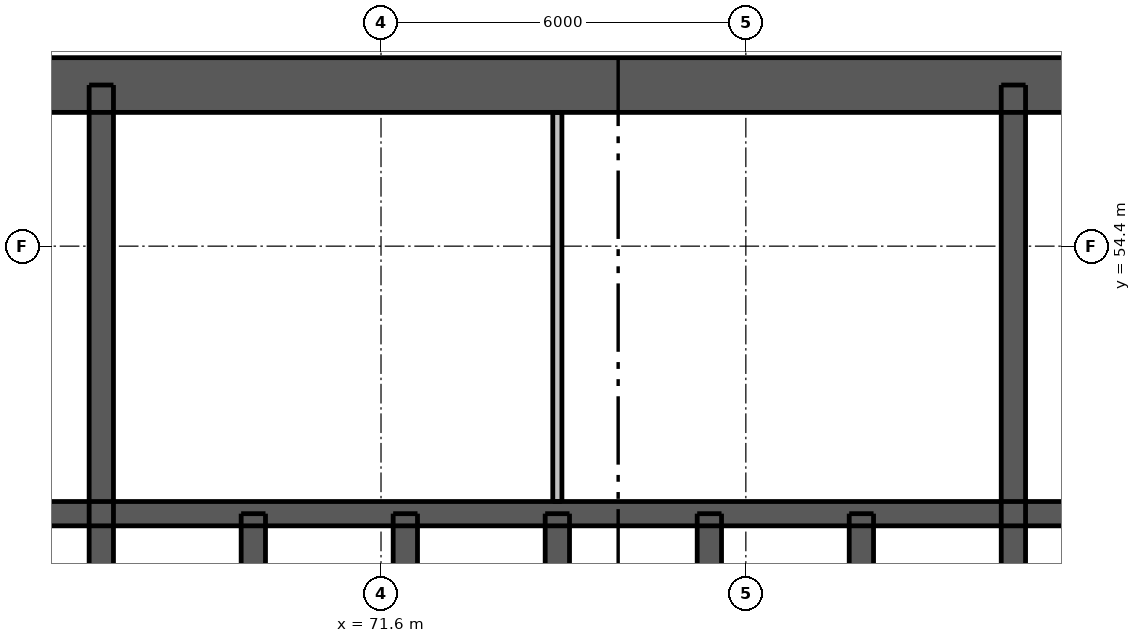
"""IFC4 building model, lengths in metres.
Left out: names, types, materials, properties, quantities, classifications, styles, units other than length and angle.
Written with IfcOpenShell. Run it as: python <this file> out.ifc"""

import sys

from ifc_helpers import new_model, si_unit, direction, frame, frame_2d, origin, place, context, subcontext, project, spatial, rectangle, extrude, element, fill, save


model = new_model("IFC4")
c1 = context("Model", 3, precision=1e-05, world=origin(), true_north=direction((0.0, 1.0)))
c2 = subcontext(c1, "Body", "Model", "MODEL_VIEW")
j1 = project(units=[si_unit("LENGTHUNIT", "METRE"), si_unit("PLANEANGLEUNIT", "RADIAN")], contexts=[c1])
p1 = place(None, origin())
s1 = spatial("IfcSite", under=j1, at=p1, CompositionType="ELEMENT")
p2 = place(p1, origin())
s2 = spatial("IfcBuilding", under=s1, at=p2, CompositionType="ELEMENT")
p3 = place(p2, frame((0.0, 0.0, 33.4)))
s3 = spatial("IfcBuildingStorey", under=s2, at=p3, CompositionType="ELEMENT", Elevation=33.4)
p4 = place(p3, frame((62.5, 57.05, 0.0), z_axis=(0.0, 0.0, 1.0), x_axis=(1.0, 0.0, 0.0)))
e1 = element("IfcWall", 1, at=p4, inside=s3, PredefinedType="SHEAR", context=c2, shape_type="SweptSolid", body=[
    extrude(rectangle(XDim=24.0, YDim=0.9, at=frame_2d((12.0, 0.0))), origin(), (0.0, 0.0, 1.0), 3.05),
])
p5 = place(p4, frame((20.85, 0.0, 0.0)))
e2 = element("IfcOpeningElement", 2, at=p5, cuts=e1, PredefinedType="OPENING", context=c2, shape_type="SweptSolid", body=[
    extrude(rectangle(XDim=1.1, YDim=2.1, at=frame_2d((0.55, 1.05))), frame((0.0, 0.46, 0.0), z_axis=(0.0, -1.0, 0.0), x_axis=(1.0, 0.0, 0.0)), (0.0, 0.0, 1.0), 0.92),
])
p6 = place(p4, frame((2.05, 0.0, 0.0)))
e3 = element("IfcOpeningElement", 3, at=p6, cuts=e1, PredefinedType="OPENING", context=c2, shape_type="SweptSolid", body=[
    extrude(rectangle(XDim=1.1, YDim=2.1, at=frame_2d((0.55, 1.05))), frame((0.0, 0.46, 0.0), z_axis=(0.0, -1.0, 0.0), x_axis=(1.0, 0.0, 0.0)), (0.0, 0.0, 1.0), 0.92),
])
p7 = place(p4, frame((7.9, 0.0, 0.0)))
e4 = element("IfcOpeningElement", 4, at=p7, cuts=e1, PredefinedType="OPENING", context=c2, shape_type="SweptSolid", body=[
    extrude(rectangle(XDim=0.9, YDim=2.1, at=frame_2d((0.45, 1.05))), frame((0.0, 0.46, 0.0), z_axis=(0.0, -1.0, 0.0), x_axis=(1.0, 0.0, 0.0)), (0.0, 0.0, 1.0), 0.92),
])
p8 = place(p4, frame((15.2, 0.0, 0.0)))
e5 = element("IfcOpeningElement", 5, at=p8, cuts=e1, PredefinedType="OPENING", context=c2, shape_type="SweptSolid", body=[
    extrude(rectangle(XDim=0.9, YDim=2.1, at=frame_2d((0.45, 1.05))), frame((0.0, 0.46, 0.0), z_axis=(0.0, -1.0, 0.0), x_axis=(1.0, 0.0, 0.0)), (0.0, 0.0, 1.0), 0.92),
])
p9 = place(p3, frame((62.95, 50.0, 0.0), z_axis=(0.0, 0.0, 1.0), x_axis=(1.0, 0.0, 0.0)))
e6 = element("IfcWall", 6, at=p9, inside=s3, PredefinedType="SHEAR", context=c2, shape_type="SweptSolid", body=[
    extrude(rectangle(XDim=23.1, YDim=0.4, at=frame_2d((11.55, 0.0))), origin(), (0.0, 0.0, 1.0), 3.05),
])
for number, where, z_axis, x_axis in (
    (7, (67.0, 47.1, 0.0), (0.0, 0.0, 1.0), (0.0, 1.0, 0.0)),
    (8, (82.0, 47.1, 0.0), (0.0, 0.0, 1.0), (0.0, 1.0, 0.0)),
):
    element("IfcWall", number, at=place(p3, frame(where, z_axis=z_axis, x_axis=x_axis)), inside=s3, PredefinedType="SHEAR", context=c2, shape_type="SweptSolid", body=[
        extrude(rectangle(XDim=9.95, YDim=0.4, at=frame_2d((4.975, 0.0))), origin(), (0.0, 0.0, 1.0), 3.05),
    ])
for number, where, z_axis, x_axis in (
    (9, (69.5, 47.1, 0.0), (0.0, 0.0, 1.0), (0.0, 1.0, 0.0)),
    (10, (72.0, 47.1, 0.0), (0.0, 0.0, 1.0), (0.0, 1.0, 0.0)),
    (11, (74.5, 47.1, 0.0), (0.0, 0.0, 1.0), (0.0, 1.0, 0.0)),
    (12, (77.0, 47.1, 0.0), (0.0, 0.0, 1.0), (0.0, 1.0, 0.0)),
    (13, (79.5, 47.1, 0.0), (0.0, 0.0, 1.0), (0.0, 1.0, 0.0)),
):
    element("IfcWall", number, at=place(p3, frame(where, z_axis=z_axis, x_axis=x_axis)), inside=s3, PredefinedType="SHEAR", context=c2, shape_type="SweptSolid", body=[
        extrude(rectangle(XDim=2.9, YDim=0.4, at=frame_2d((1.45, 0.0))), origin(), (0.0, 0.0, 1.0), 3.05),
    ])
p10 = place(p3, frame((74.5, 50.2, 0.0), z_axis=(0.0, 0.0, 1.0), x_axis=(0.0, 1.0, 0.0)))
e14 = element("IfcWall", 14, at=p10, inside=s3, PredefinedType="PLUMBINGWALL", context=c2, shape_type="SweptSolid", body=[
    extrude(rectangle(XDim=6.4, YDim=0.15, at=frame_2d((3.2, 0.0))), origin(), (0.0, 0.0, 1.0), 3.05),
])
p11 = place(p7, origin())
e15 = element("IfcDoor", 15, at=p11, inside=s3, OperationType="SINGLE_SWING_RIGHT", PredefinedType="DOOR", context=c2, shape_type="SweptSolid", body=[
    extrude(rectangle(XDim=0.9, YDim=2.1, at=frame_2d((0.45, 1.05))), frame((0.0, -0.388, 0.0), z_axis=(0.0, -1.0, 0.0), x_axis=(1.0, 0.0, 0.0)), (0.0, 0.0, 1.0), 0.05),
])
fill(e4, e15)
p12 = place(p8, origin())
e16 = element("IfcDoor", 16, at=p12, inside=s3, OperationType="SINGLE_SWING_RIGHT", PredefinedType="DOOR", context=c2, shape_type="SweptSolid", body=[
    extrude(rectangle(XDim=0.9, YDim=2.1, at=frame_2d((0.45, 1.05))), frame((0.0, -0.388, 0.0), z_axis=(0.0, -1.0, 0.0), x_axis=(1.0, 0.0, 0.0)), (0.0, 0.0, 1.0), 0.05),
])
fill(e5, e16)
save(model, sys.argv[1])
